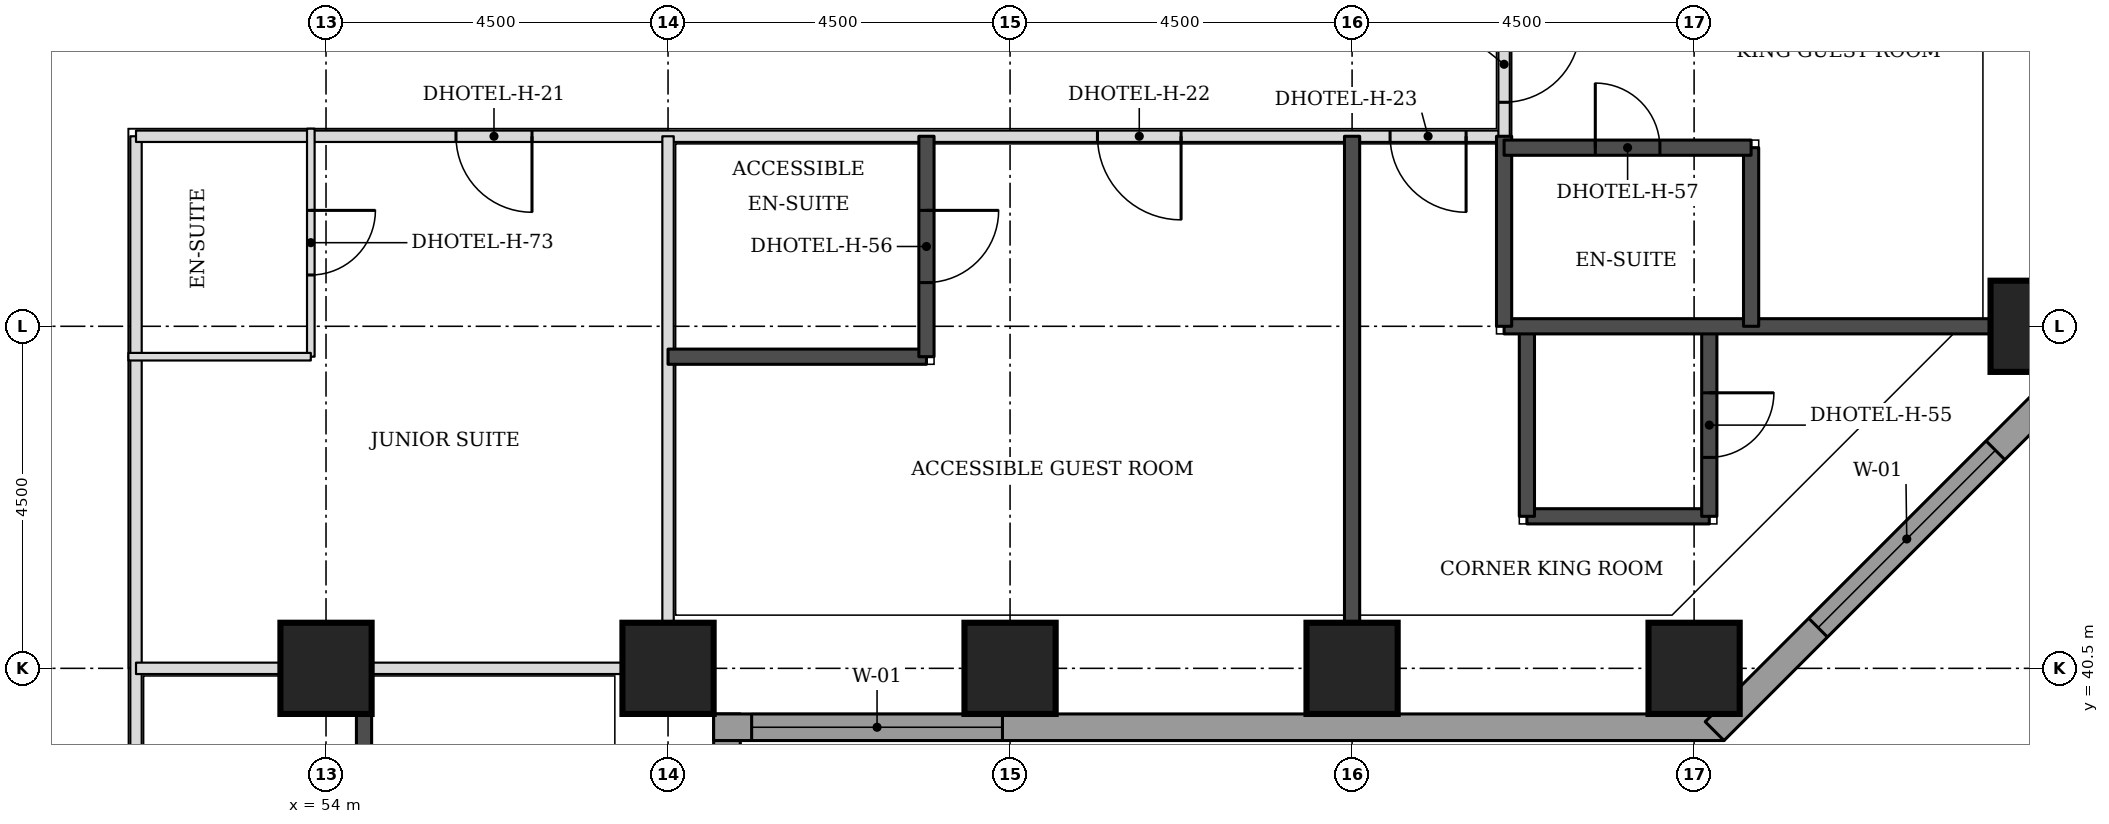
"""IFC4 building model, lengths in metres.
Left out: names, types, materials, properties, quantities, classifications, styles, units other than length and angle.
Written with IfcOpenShell. Run it as: python <this file> out.ifc"""

import sys

from ifc_helpers import new_model, si_unit, direction, frame, frame_2d, origin, origin_2d, place, context, subcontext, project, spatial, rectangle, extrude, element, fill, save


model = new_model("IFC4")
c1 = context("Model", 3, precision=1e-05, world=origin(), true_north=direction((0.0, 1.0)))
c2 = subcontext(c1, "Body", "Model", "MODEL_VIEW")
j1 = project(units=[si_unit("LENGTHUNIT", "METRE"), si_unit("PLANEANGLEUNIT", "RADIAN")], contexts=[c1])
p1 = place(None, origin())
s1 = spatial("IfcSite", under=j1, at=p1, CompositionType="ELEMENT")
p2 = place(p1, origin())
s2 = spatial("IfcBuilding", under=s1, at=p2, CompositionType="ELEMENT")
p3 = place(p2, frame((0.0, 0.0, 46.2)))
s3 = spatial("IfcBuildingStorey", under=s2, at=p3, CompositionType="ELEMENT", Elevation=46.2)
for number, where, z_axis, x_axis in (
    (1, (54.0, 40.5, 0.0), (0.0, 0.0, 1.0), (1.0, 0.0, 0.0)),
    (2, (58.5, 40.5, 0.0), (0.0, 0.0, 1.0), (1.0, 0.0, 0.0)),
    (3, (63.0, 40.5, 0.0), (0.0, 0.0, 1.0), (1.0, 0.0, 0.0)),
    (4, (67.5, 40.5, 0.0), (0.0, 0.0, 1.0), (1.0, 0.0, 0.0)),
    (5, (72.0, 40.5, 0.0), (0.0, 0.0, 1.0), (1.0, 0.0, 0.0)),
    (6, (76.5, 45.0, 0.0), (0.0, 0.0, 1.0), (1.0, 0.0, 0.0)),
):
    element("IfcColumn", number, at=place(p3, frame(where, z_axis=z_axis, x_axis=x_axis)), inside=s3, PredefinedType="COLUMN", context=c2, shape_type="SweptSolid", body=[
        extrude(rectangle(XDim=1.2, YDim=1.2, at=origin_2d()), origin(), (0.0, 0.0, 1.0), 3.3),
    ])
p4 = place(p3, frame((59.275, 22.106, 0.0), z_axis=(0.0, 0.0, 1.0), x_axis=(0.0, 1.0, 0.0)))
e7 = element("IfcWall", 7, at=p4, inside=s3, PredefinedType="STANDARD", context=c2, shape_type="SweptSolid", body=[
    extrude(rectangle(XDim=17.793, YDim=0.35, at=frame_2d((8.897, 0.0))), origin(), (0.0, 0.0, 1.0), 3.055),
])
p5 = place(p4, frame((5.493, 0.0, 0.8)))
e8 = element("IfcOpeningElement", 8, at=p5, cuts=e7, PredefinedType="OPENING", context=c2, shape_type="SweptSolid", body=[
    extrude(rectangle(XDim=3.3, YDim=1.5, at=frame_2d((1.65, 0.75))), frame((0.0, 0.185, 0.0), z_axis=(0.0, -1.0, 0.0), x_axis=(1.0, 0.0, 0.0)), (0.0, 0.0, 1.0), 0.37),
])
p6 = place(p4, frame((13.993, 0.0, 0.8)))
e9 = element("IfcOpeningElement", 9, at=p6, cuts=e7, PredefinedType="OPENING", context=c2, shape_type="SweptSolid", body=[
    extrude(rectangle(XDim=3.3, YDim=1.5, at=frame_2d((1.65, 0.75))), frame((0.0, 0.185, 0.0), z_axis=(0.0, -1.0, 0.0), x_axis=(1.0, 0.0, 0.0)), (0.0, 0.0, 1.0), 0.37),
])
p7 = place(p3, frame((59.1, 39.725, 0.0), z_axis=(0.0, 0.0, 1.0), x_axis=(1.0, 0.0, 0.0)))
e10 = element("IfcWall", 10, at=p7, inside=s3, PredefinedType="STANDARD", context=c2, shape_type="SweptSolid", body=[
    extrude(rectangle(XDim=13.293, YDim=0.35, at=frame_2d((6.647, 0.0))), origin(), (0.0, 0.0, 1.0), 3.055),
])
p8 = place(p7, frame((0.5, 0.0, 0.8)))
e11 = element("IfcOpeningElement", 11, at=p8, cuts=e10, PredefinedType="OPENING", context=c2, shape_type="SweptSolid", body=[
    extrude(rectangle(XDim=3.3, YDim=1.5, at=frame_2d((1.65, 0.75))), frame((0.0, 0.185, 0.0), z_axis=(0.0, -1.0, 0.0), x_axis=(1.0, 0.0, 0.0)), (0.0, 0.0, 1.0), 0.37),
])
p9 = place(p3, frame((72.27, 39.674, 0.0), z_axis=(0.0, 0.0, 1.0), x_axis=(0.707106781187, 0.707106781187, 0.0)))
e12 = element("IfcWall", 12, at=p9, inside=s3, PredefinedType="STANDARD", context=c2, shape_type="SweptSolid", body=[
    extrude(rectangle(XDim=7.151, YDim=0.35, at=frame_2d((3.576, 0.0))), origin(), (0.0, 0.0, 1.0), 3.055),
])
p10 = place(p9, frame((1.926, 0.0, 0.8)))
e13 = element("IfcOpeningElement", 13, at=p10, cuts=e12, PredefinedType="OPENING", context=c2, shape_type="SweptSolid", body=[
    extrude(rectangle(XDim=3.3, YDim=1.5, at=frame_2d((1.65, 0.75))), frame((0.0, 0.185, 0.0), z_axis=(0.0, -1.0, 0.0), x_axis=(1.0, 0.0, 0.0)), (0.0, 0.0, 1.0), 0.37),
])
p11 = place(p3, frame((51.5, 25.15, 0.0), z_axis=(0.0, 0.0, 1.0), x_axis=(0.0, 1.0, 0.0)))
e14 = element("IfcWall", 14, at=p11, inside=s3, PredefinedType="PARTITIONING", context=c2, shape_type="SweptSolid", body=[
    extrude(rectangle(XDim=22.35, YDim=0.15, at=frame_2d((11.175, 0.0))), origin(), (0.0, 0.0, 1.0), 3.08),
])
p12 = place(p11, frame((0.347, 0.0, 0.0)))
e15 = element("IfcOpeningElement", 15, at=p12, cuts=e14, PredefinedType="OPENING", context=c2, shape_type="SweptSolid", body=[
    extrude(rectangle(XDim=1.0, YDim=2.1, at=frame_2d((0.5, 1.05))), frame((0.0, 0.085, 0.0), z_axis=(0.0, -1.0, 0.0), x_axis=(1.0, 0.0, 0.0)), (0.0, 0.0, 1.0), 0.17),
])
p13 = place(p11, frame((7.325, 0.0, 0.0)))
e16 = element("IfcOpeningElement", 16, at=p13, cuts=e14, PredefinedType="OPENING", context=c2, shape_type="SweptSolid", body=[
    extrude(rectangle(XDim=1.0, YDim=2.1, at=frame_2d((0.5, 1.05))), frame((0.0, 0.085, 0.0), z_axis=(0.0, -1.0, 0.0), x_axis=(1.0, 0.0, 0.0)), (0.0, 0.0, 1.0), 0.17),
])
p14 = place(p11, frame((11.675, 0.0, 0.0)))
e17 = element("IfcOpeningElement", 17, at=p14, cuts=e14, PredefinedType="OPENING", context=c2, shape_type="SweptSolid", body=[
    extrude(rectangle(XDim=1.0, YDim=2.1, at=frame_2d((0.5, 1.05))), frame((0.0, 0.085, 0.0), z_axis=(0.0, -1.0, 0.0), x_axis=(1.0, 0.0, 0.0)), (0.0, 0.0, 1.0), 0.17),
])
p15 = place(p3, frame((51.5, 47.5, 0.0), z_axis=(0.0, 0.0, 1.0), x_axis=(1.0, 0.0, 0.0)))
e18 = element("IfcWall", 18, at=p15, inside=s3, PredefinedType="PARTITIONING", context=c2, shape_type="SweptSolid", body=[
    extrude(rectangle(XDim=18.0, YDim=0.15, at=frame_2d((9.0, 0.0))), origin(), (0.0, 0.0, 1.0), 3.08),
])
p16 = place(p15, frame((12.65, 0.0, 0.0)))
e19 = element("IfcOpeningElement", 19, at=p16, cuts=e18, PredefinedType="OPENING", context=c2, shape_type="SweptSolid", body=[
    extrude(rectangle(XDim=1.1, YDim=2.1, at=frame_2d((0.55, 1.05))), frame((0.0, 0.085, 0.0), z_axis=(0.0, -1.0, 0.0), x_axis=(1.0, 0.0, 0.0)), (0.0, 0.0, 1.0), 0.17),
])
p17 = place(p15, frame((16.5, 0.0, 0.0)))
e20 = element("IfcOpeningElement", 20, at=p17, cuts=e18, PredefinedType="OPENING", context=c2, shape_type="SweptSolid", body=[
    extrude(rectangle(XDim=1.0, YDim=2.1, at=frame_2d((0.5, 1.05))), frame((0.0, 0.085, 0.0), z_axis=(0.0, -1.0, 0.0), x_axis=(1.0, 0.0, 0.0)), (0.0, 0.0, 1.0), 0.17),
])
p18 = place(p15, frame((4.21, 0.0, 0.0)))
e21 = element("IfcOpeningElement", 21, at=p18, cuts=e18, PredefinedType="OPENING", context=c2, shape_type="SweptSolid", body=[
    extrude(rectangle(XDim=1.0, YDim=2.1, at=frame_2d((0.5, 1.05))), frame((0.0, 0.085, 0.0), z_axis=(0.0, -1.0, 0.0), x_axis=(1.0, 0.0, 0.0)), (0.0, 0.0, 1.0), 0.17),
])
p19 = place(p3, frame((69.5, 47.5, 0.0), z_axis=(0.0, 0.0, 1.0), x_axis=(0.0, 1.0, 0.0)))
e22 = element("IfcWall", 22, at=p19, inside=s3, PredefinedType="PARTITIONING", context=c2, shape_type="SweptSolid", body=[
    extrude(rectangle(XDim=26.5, YDim=0.15, at=frame_2d((13.25, 0.0))), origin(), (0.0, 0.0, 1.0), 3.08),
])
p20 = place(p19, frame((25.053, 0.0, 0.0)))
e23 = element("IfcOpeningElement", 23, at=p20, cuts=e22, PredefinedType="OPENING", context=c2, shape_type="SweptSolid", body=[
    extrude(rectangle(XDim=1.0, YDim=2.1, at=frame_2d((0.5, 1.05))), frame((0.0, 0.085, 0.0), z_axis=(0.0, -1.0, 0.0), x_axis=(1.0, 0.0, 0.0)), (0.0, 0.0, 1.0), 0.17),
])
p21 = place(p19, frame((20.575, 0.0, 0.0)))
e24 = element("IfcOpeningElement", 24, at=p21, cuts=e22, PredefinedType="OPENING", context=c2, shape_type="SweptSolid", body=[
    extrude(rectangle(XDim=1.0, YDim=2.1, at=frame_2d((0.5, 1.05))), frame((0.0, 0.085, 0.0), z_axis=(0.0, -1.0, 0.0), x_axis=(1.0, 0.0, 0.0)), (0.0, 0.0, 1.0), 0.17),
])
p22 = place(p19, frame((18.175, 0.0, 0.0)))
e25 = element("IfcOpeningElement", 25, at=p22, cuts=e22, PredefinedType="OPENING", context=c2, shape_type="SweptSolid", body=[
    extrude(rectangle(XDim=1.0, YDim=2.1, at=frame_2d((0.5, 1.05))), frame((0.0, 0.085, 0.0), z_axis=(0.0, -1.0, 0.0), x_axis=(1.0, 0.0, 0.0)), (0.0, 0.0, 1.0), 0.17),
])
p23 = place(p19, frame((11.575, 0.0, 0.0)))
e26 = element("IfcOpeningElement", 26, at=p23, cuts=e22, PredefinedType="OPENING", context=c2, shape_type="SweptSolid", body=[
    extrude(rectangle(XDim=1.0, YDim=2.1, at=frame_2d((0.5, 1.05))), frame((0.0, 0.085, 0.0), z_axis=(0.0, -1.0, 0.0), x_axis=(1.0, 0.0, 0.0)), (0.0, 0.0, 1.0), 0.17),
])
p24 = place(p19, frame((7.65, 0.0, 0.0)))
e27 = element("IfcOpeningElement", 27, at=p24, cuts=e22, PredefinedType="OPENING", context=c2, shape_type="SweptSolid", body=[
    extrude(rectangle(XDim=1.1, YDim=2.1, at=frame_2d((0.55, 1.05))), frame((0.0, 0.085, 0.0), z_axis=(0.0, -1.0, 0.0), x_axis=(1.0, 0.0, 0.0)), (0.0, 0.0, 1.0), 0.17),
])
p25 = place(p19, frame((0.447, 0.0, 0.0)))
e28 = element("IfcOpeningElement", 28, at=p25, cuts=e22, PredefinedType="OPENING", context=c2, shape_type="SweptSolid", body=[
    extrude(rectangle(XDim=1.0, YDim=2.1, at=frame_2d((0.5, 1.05))), frame((0.0, 0.085, 0.0), z_axis=(0.0, -1.0, 0.0), x_axis=(1.0, 0.0, 0.0)), (0.0, 0.0, 1.0), 0.17),
])
p26 = place(p3, frame((54.5, 38.65, 0.0), z_axis=(0.0, 0.0, 1.0), x_axis=(0.0, 1.0, 0.0)))
e29 = element("IfcWall", 29, at=p26, inside=s3, PredefinedType="SOLIDWALL", context=c2, shape_type="SweptSolid", body=[
    extrude(rectangle(XDim=1.85, YDim=0.2, at=frame_2d((0.925, 0.0))), origin(), (0.0, 0.0, 1.0), 3.08),
])
p27 = place(p3, frame((67.5, 41.1, 0.0), z_axis=(0.0, 0.0, 1.0), x_axis=(0.0, 1.0, 0.0)))
e30 = element("IfcWall", 30, at=p27, inside=s3, PredefinedType="SOLIDWALL", context=c2, shape_type="SweptSolid", body=[
    extrude(rectangle(XDim=6.4, YDim=0.2, at=frame_2d((3.2, 0.0))), origin(), (0.0, 0.0, 1.0), 3.08),
])
p28 = place(p3, frame((69.8, 42.5, 0.0), z_axis=(0.0, 0.0, 1.0), x_axis=(1.0, 0.0, 0.0)))
e31 = element("IfcWall", 31, at=p28, inside=s3, PredefinedType="SOLIDWALL", context=c2, shape_type="SweptSolid", body=[
    extrude(rectangle(XDim=2.4, YDim=0.2, at=frame_2d((1.2, 0.0))), origin(), (0.0, 0.0, 1.0), 3.08),
])
p29 = place(p3, frame((69.8, 42.5, 0.0), z_axis=(0.0, 0.0, 1.0), x_axis=(0.0, 1.0, 0.0)))
e32 = element("IfcWall", 32, at=p29, inside=s3, PredefinedType="SOLIDWALL", context=c2, shape_type="SweptSolid", body=[
    extrude(rectangle(XDim=2.5, YDim=0.2, at=frame_2d((1.25, 0.0))), origin(), (0.0, 0.0, 1.0), 3.08),
])
p30 = place(p3, frame((72.2, 42.5, 0.0), z_axis=(0.0, 0.0, 1.0), x_axis=(0.0, 1.0, 0.0)))
e33 = element("IfcWall", 33, at=p30, inside=s3, PredefinedType="SOLIDWALL", context=c2, shape_type="SweptSolid", body=[
    extrude(rectangle(XDim=2.5, YDim=0.2, at=frame_2d((1.25, 0.0))), origin(), (0.0, 0.0, 1.0), 3.08),
])
p31 = place(p30, frame((0.775, 0.0, 0.0)))
e34 = element("IfcOpeningElement", 34, at=p31, cuts=e33, PredefinedType="OPENING", context=c2, shape_type="SweptSolid", body=[
    extrude(rectangle(XDim=0.85, YDim=2.1, at=frame_2d((0.425, 1.05))), frame((0.0, 0.11, 0.0), z_axis=(0.0, -1.0, 0.0), x_axis=(1.0, 0.0, 0.0)), (0.0, 0.0, 1.0), 0.22),
])
p32 = place(p3, frame((58.5, 44.6, 0.0), z_axis=(0.0, 0.0, 1.0), x_axis=(1.0, 0.0, 0.0)))
e35 = element("IfcWall", 35, at=p32, inside=s3, PredefinedType="SOLIDWALL", context=c2, shape_type="SweptSolid", body=[
    extrude(rectangle(XDim=3.4, YDim=0.2, at=frame_2d((1.7, 0.0))), origin(), (0.0, 0.0, 1.0), 3.08),
])
p33 = place(p3, frame((61.9, 44.6, 0.0), z_axis=(0.0, 0.0, 1.0), x_axis=(0.0, 1.0, 0.0)))
e36 = element("IfcWall", 36, at=p33, inside=s3, PredefinedType="SOLIDWALL", context=c2, shape_type="SweptSolid", body=[
    extrude(rectangle(XDim=2.9, YDim=0.2, at=frame_2d((1.45, 0.0))), origin(), (0.0, 0.0, 1.0), 3.08),
])
p34 = place(p33, frame((0.975, 0.0, 0.0)))
e37 = element("IfcOpeningElement", 37, at=p34, cuts=e36, PredefinedType="OPENING", context=c2, shape_type="SweptSolid", body=[
    extrude(rectangle(XDim=0.95, YDim=2.1, at=frame_2d((0.475, 1.05))), frame((0.0, 0.11, 0.0), z_axis=(0.0, -1.0, 0.0), x_axis=(1.0, 0.0, 0.0)), (0.0, 0.0, 1.0), 0.22),
])
p35 = place(p3, frame((69.5, 45.0, 0.0), z_axis=(0.0, 0.0, 1.0), x_axis=(1.0, 0.0, 0.0)))
e38 = element("IfcWall", 38, at=p35, inside=s3, PredefinedType="SOLIDWALL", context=c2, shape_type="SweptSolid", body=[
    extrude(rectangle(XDim=6.4, YDim=0.2, at=frame_2d((3.2, 0.0))), origin(), (0.0, 0.0, 1.0), 3.08),
])
p36 = place(p3, frame((69.5, 45.0, 0.0), z_axis=(0.0, 0.0, 1.0), x_axis=(0.0, 1.0, 0.0)))
e39 = element("IfcWall", 39, at=p36, inside=s3, PredefinedType="SOLIDWALL", context=c2, shape_type="SweptSolid", body=[
    extrude(rectangle(XDim=2.5, YDim=0.2, at=frame_2d((1.25, 0.0))), origin(), (0.0, 0.0, 1.0), 3.08),
])
p37 = place(p3, frame((72.75, 45.0, 0.0), z_axis=(0.0, 0.0, 1.0), x_axis=(0.0, 1.0, 0.0)))
e40 = element("IfcWall", 40, at=p37, inside=s3, PredefinedType="SOLIDWALL", context=c2, shape_type="SweptSolid", body=[
    extrude(rectangle(XDim=2.35, YDim=0.2, at=frame_2d((1.175, 0.0))), origin(), (0.0, 0.0, 1.0), 3.08),
])
p38 = place(p3, frame((69.5, 47.35, 0.0), z_axis=(0.0, 0.0, 1.0), x_axis=(1.0, 0.0, 0.0)))
e41 = element("IfcWall", 41, at=p38, inside=s3, PredefinedType="SOLIDWALL", context=c2, shape_type="SweptSolid", body=[
    extrude(rectangle(XDim=3.25, YDim=0.2, at=frame_2d((1.625, 0.0))), origin(), (0.0, 0.0, 1.0), 3.08),
])
p39 = place(p38, frame((1.2, 0.0, 0.0)))
e42 = element("IfcOpeningElement", 42, at=p39, cuts=e41, PredefinedType="OPENING", context=c2, shape_type="SweptSolid", body=[
    extrude(rectangle(XDim=0.85, YDim=2.1, at=frame_2d((0.425, 1.05))), frame((0.0, 0.11, 0.0), z_axis=(0.0, -1.0, 0.0), x_axis=(1.0, 0.0, 0.0)), (0.0, 0.0, 1.0), 0.22),
])
p40 = place(p3, frame((51.5, 40.5, 0.0), z_axis=(0.0, 0.0, 1.0), x_axis=(1.0, 0.0, 0.0)))
e43 = element("IfcWall", 43, at=p40, inside=s3, PredefinedType="PARTITIONING", context=c2, shape_type="SweptSolid", body=[
    extrude(rectangle(XDim=6.4, YDim=0.15, at=frame_2d((3.2, 0.0))), origin(), (0.0, 0.0, 1.0), 2.33),
])
p41 = place(p3, frame((58.5, 41.1, 0.0), z_axis=(0.0, 0.0, 1.0), x_axis=(0.0, 1.0, 0.0)))
e44 = element("IfcWall", 44, at=p41, inside=s3, PredefinedType="PARTITIONING", context=c2, shape_type="SweptSolid", body=[
    extrude(rectangle(XDim=6.4, YDim=0.15, at=frame_2d((3.2, 0.0))), origin(), (0.0, 0.0, 1.0), 3.08),
])
p42 = place(p3, frame((53.8, 47.6, 0.0), z_axis=(0.0, 0.0, 1.0), x_axis=(0.0, -1.0, 0.0)))
e45 = element("IfcWall", 45, at=p42, inside=s3, PredefinedType="PARTITIONING", context=c2, shape_type="SweptSolid", body=[
    extrude(rectangle(XDim=3.0, YDim=0.1, at=frame_2d((1.5, 0.0))), origin(), (0.0, 0.0, 1.0), 3.08),
])
p43 = place(p42, frame((1.075, 0.0, 0.0)))
e46 = element("IfcOpeningElement", 46, at=p43, cuts=e45, PredefinedType="OPENING", context=c2, shape_type="SweptSolid", body=[
    extrude(rectangle(XDim=0.85, YDim=2.1, at=frame_2d((0.425, 1.05))), frame((0.0, 0.06, 0.0), z_axis=(0.0, -1.0, 0.0), x_axis=(1.0, 0.0, 0.0)), (0.0, 0.0, 1.0), 0.12),
])
p44 = place(p3, frame((53.8, 44.6, 0.0), z_axis=(0.0, 0.0, 1.0), x_axis=(-1.0, 0.0, 0.0)))
e47 = element("IfcWall", 47, at=p44, inside=s3, PredefinedType="PARTITIONING", context=c2, shape_type="SweptSolid", body=[
    extrude(rectangle(XDim=2.4, YDim=0.1, at=frame_2d((1.2, 0.0))), origin(), (0.0, 0.0, 1.0), 3.08),
])
p45 = place(p8, origin())
e48 = element("IfcWindow", 48, at=p45, inside=s3, PartitioningType="SINGLE_PANEL", PredefinedType="WINDOW", context=c2, shape_type="SweptSolid", body=[
    extrude(rectangle(XDim=3.3, YDim=1.5, at=frame_2d((1.65, 0.75))), frame((0.0, 0.085, 0.0), z_axis=(0.0, -1.0, 0.0), x_axis=(1.0, 0.0, 0.0)), (0.0, 0.0, 1.0), 0.06),
])
fill(e11, e48)
p46 = place(p10, origin())
e49 = element("IfcWindow", 49, at=p46, inside=s3, PartitioningType="SINGLE_PANEL", PredefinedType="WINDOW", context=c2, shape_type="SweptSolid", body=[
    extrude(rectangle(XDim=3.3, YDim=1.5, at=frame_2d((1.65, 0.75))), frame((0.0, 0.085, 0.0), z_axis=(0.0, -1.0, 0.0), x_axis=(1.0, 0.0, 0.0)), (0.0, 0.0, 1.0), 0.06),
])
fill(e13, e49)
p47 = place(p25, frame((1.0, 0.0, 0.0), z_axis=(0.0, 0.0, 1.0), x_axis=(-1.0, 0.0, 0.0)))
e50 = element("IfcDoor", 50, at=p47, inside=s3, OperationType="SINGLE_SWING_LEFT", PredefinedType="DOOR", context=c2, shape_type="SweptSolid", body=[
    extrude(rectangle(XDim=1.0, YDim=2.1, at=frame_2d((0.5, 1.05))), frame((0.0, 0.025, 0.0), z_axis=(0.0, -1.0, 0.0), x_axis=(1.0, 0.0, 0.0)), (0.0, 0.0, 1.0), 0.05),
])
fill(e28, e50)
p48 = place(p39, origin())
e51 = element("IfcDoor", 51, at=p48, inside=s3, OperationType="SINGLE_SWING_LEFT", PredefinedType="DOOR", context=c2, shape_type="SweptSolid", body=[
    extrude(rectangle(XDim=0.85, YDim=2.1, at=frame_2d((0.425, 1.05))), frame((0.0, 0.025, 0.0), z_axis=(0.0, -1.0, 0.0), x_axis=(1.0, 0.0, 0.0)), (0.0, 0.0, 1.0), 0.05),
])
fill(e42, e51)
p49 = place(p16, frame((1.1, 0.0, 0.0), z_axis=(0.0, 0.0, 1.0), x_axis=(-1.0, 0.0, 0.0)))
e52 = element("IfcDoor", 52, at=p49, inside=s3, OperationType="SINGLE_SWING_LEFT", PredefinedType="DOOR", context=c2, shape_type="SweptSolid", body=[
    extrude(rectangle(XDim=1.1, YDim=2.1, at=frame_2d((0.55, 1.05))), frame((0.0, 0.025, 0.0), z_axis=(0.0, -1.0, 0.0), x_axis=(1.0, 0.0, 0.0)), (0.0, 0.0, 1.0), 0.05),
])
fill(e19, e52)
p50 = place(p34, frame((0.95, 0.0, 0.0), z_axis=(0.0, 0.0, 1.0), x_axis=(-1.0, 0.0, 0.0)))
e53 = element("IfcDoor", 53, at=p50, inside=s3, OperationType="SINGLE_SWING_LEFT", PredefinedType="DOOR", context=c2, shape_type="SweptSolid", body=[
    extrude(rectangle(XDim=0.95, YDim=2.1, at=frame_2d((0.475, 1.05))), frame((0.0, 0.025, 0.0), z_axis=(0.0, -1.0, 0.0), x_axis=(1.0, 0.0, 0.0)), (0.0, 0.0, 1.0), 0.05),
])
fill(e37, e53)
p51 = place(p17, frame((1.0, 0.0, 0.0), z_axis=(0.0, 0.0, 1.0), x_axis=(-1.0, 0.0, 0.0)))
e54 = element("IfcDoor", 54, at=p51, inside=s3, OperationType="SINGLE_SWING_LEFT", PredefinedType="DOOR", context=c2, shape_type="SweptSolid", body=[
    extrude(rectangle(XDim=1.0, YDim=2.1, at=frame_2d((0.5, 1.05))), frame((0.0, 0.025, 0.0), z_axis=(0.0, -1.0, 0.0), x_axis=(1.0, 0.0, 0.0)), (0.0, 0.0, 1.0), 0.05),
])
fill(e20, e54)
p52 = place(p31, frame((0.85, 0.0, 0.0), z_axis=(0.0, 0.0, 1.0), x_axis=(-1.0, 0.0, 0.0)))
e55 = element("IfcDoor", 55, at=p52, inside=s3, OperationType="SINGLE_SWING_LEFT", PredefinedType="DOOR", context=c2, shape_type="SweptSolid", body=[
    extrude(rectangle(XDim=0.85, YDim=2.1, at=frame_2d((0.425, 1.05))), frame((0.0, 0.025, 0.0), z_axis=(0.0, -1.0, 0.0), x_axis=(1.0, 0.0, 0.0)), (0.0, 0.0, 1.0), 0.05),
])
fill(e34, e55)
p53 = place(p18, frame((1.0, 0.0, 0.0), z_axis=(0.0, 0.0, 1.0), x_axis=(-1.0, 0.0, 0.0)))
e56 = element("IfcDoor", 56, at=p53, inside=s3, OperationType="SINGLE_SWING_LEFT", PredefinedType="DOOR", context=c2, shape_type="SweptSolid", body=[
    extrude(rectangle(XDim=1.0, YDim=2.1, at=frame_2d((0.5, 1.05))), frame((0.0, 0.025, 0.0), z_axis=(0.0, -1.0, 0.0), x_axis=(1.0, 0.0, 0.0)), (0.0, 0.0, 1.0), 0.05),
])
fill(e21, e56)
p54 = place(p43, origin())
e57 = element("IfcDoor", 57, at=p54, inside=s3, OperationType="SINGLE_SWING_LEFT", PredefinedType="DOOR", context=c2, shape_type="SweptSolid", body=[
    extrude(rectangle(XDim=0.85, YDim=2.1, at=frame_2d((0.425, 1.05))), frame((0.0, 0.025, 0.0), z_axis=(0.0, -1.0, 0.0), x_axis=(1.0, 0.0, 0.0)), (0.0, 0.0, 1.0), 0.05),
])
fill(e46, e57)
save(model, sys.argv[1])
